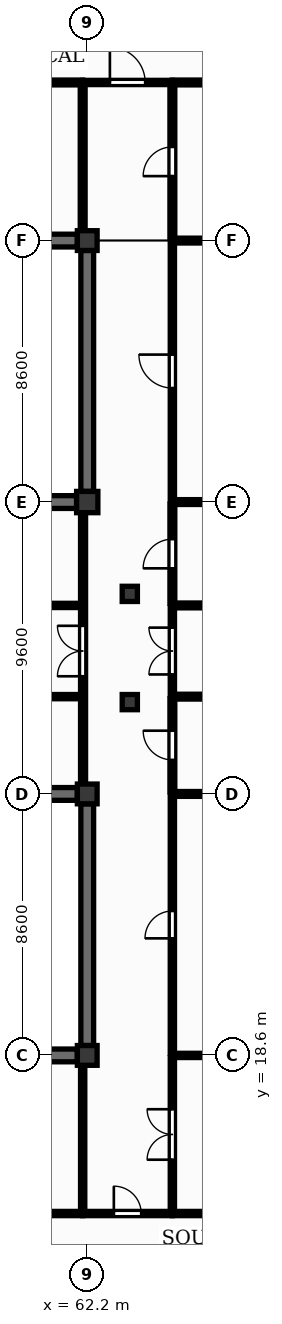
"""IFC4 building model, lengths in metres.
Left out: names, types, materials, properties, quantities, classifications, styles, units other than length and angle.
Written with IfcOpenShell. Run it as: python <this file> out.ifc"""

import sys

from ifc_helpers import new_model, si_unit, direction, frame, frame_2d, origin, origin_2d, place, context, subcontext, project, spatial, rectangle, extrude, element, fill, save


model = new_model("IFC4")
c1 = context("Model", 3, precision=1e-05, world=origin(), true_north=direction((0.0, 1.0)))
c2 = subcontext(c1, "Body", "Model", "MODEL_VIEW")
j1 = project(units=[si_unit("LENGTHUNIT", "METRE"), si_unit("PLANEANGLEUNIT", "RADIAN")], contexts=[c1])
p1 = place(None, origin())
s1 = spatial("IfcSite", under=j1, at=p1, CompositionType="ELEMENT")
p2 = place(p1, origin())
s2 = spatial("IfcBuilding", under=s1, at=p2, CompositionType="ELEMENT")
p3 = place(p2, frame((0.0, 0.0, -4.5)))
s3 = spatial("IfcBuildingStorey", under=s2, at=p3, CompositionType="ELEMENT", Elevation=-4.5)
for number, where, z_axis, x_axis in (
    (1, (62.2, 18.6, 0.0), (0.0, 0.0, 1.0), (1.0, 0.0, 0.0)),
    (2, (62.2, 27.2, 0.0), (0.0, 0.0, 1.0), (1.0, 0.0, 0.0)),
):
    element("IfcColumn", number, at=place(p3, frame(where, z_axis=z_axis, x_axis=x_axis)), inside=s3, PredefinedType="COLUMN", context=c2, shape_type="SweptSolid", body=[
        extrude(rectangle(XDim=0.65, YDim=0.65, at=origin_2d()), origin(), (0.0, 0.0, 1.0), 4.2),
    ])
p4 = place(p3, frame((62.2, 36.8, 0.0), z_axis=(0.0, 0.0, 1.0), x_axis=(1.0, 0.0, 0.0)))
e3 = element("IfcColumn", 3, at=p4, inside=s3, PredefinedType="COLUMN", context=c2, shape_type="SweptSolid", body=[
    extrude(rectangle(XDim=0.7, YDim=0.7, at=origin_2d()), origin(), (0.0, 0.0, 1.0), 4.2),
])
p5 = place(p3, frame((62.2, 45.4, 0.0), z_axis=(0.0, 0.0, 1.0), x_axis=(1.0, 0.0, 0.0)))
e4 = element("IfcColumn", 4, at=p5, inside=s3, PredefinedType="COLUMN", context=c2, shape_type="SweptSolid", body=[
    extrude(rectangle(XDim=0.65, YDim=0.65, at=origin_2d()), origin(), (0.0, 0.0, 1.0), 4.2),
])
p6 = place(p3, frame((55.35, 18.6, 0.0), z_axis=(0.0, 0.0, 1.0), x_axis=(1.0, 0.0, 0.0)))
e5 = element("IfcWall", 5, at=p6, inside=s3, PredefinedType="USERDEFINED", context=c2, shape_type="SweptSolid", body=[
    extrude(rectangle(XDim=6.525, YDim=0.42, at=frame_2d((3.262, 0.0))), origin(), (0.0, 0.0, 1.0), 4.2),
])
p7 = place(p3, frame((55.275, 27.2, 0.0), z_axis=(0.0, 0.0, 1.0), x_axis=(1.0, 0.0, 0.0)))
e6 = element("IfcWall", 6, at=p7, inside=s3, PredefinedType="USERDEFINED", context=c2, shape_type="SweptSolid", body=[
    extrude(rectangle(XDim=6.6, YDim=0.42, at=frame_2d((3.3, 0.0))), origin(), (0.0, 0.0, 1.0), 4.2),
])
p8 = place(p3, frame((55.275, 36.8, 0.0), z_axis=(0.0, 0.0, 1.0), x_axis=(1.0, 0.0, 0.0)))
e7 = element("IfcWall", 7, at=p8, inside=s3, PredefinedType="USERDEFINED", context=c2, shape_type="SweptSolid", body=[
    extrude(rectangle(XDim=6.575, YDim=0.42, at=frame_2d((3.288, 0.0))), origin(), (0.0, 0.0, 1.0), 4.2),
])
p9 = place(p3, frame((55.35, 45.4, 0.0), z_axis=(0.0, 0.0, 1.0), x_axis=(1.0, 0.0, 0.0)))
e8 = element("IfcWall", 8, at=p9, inside=s3, PredefinedType="USERDEFINED", context=c2, shape_type="SweptSolid", body=[
    extrude(rectangle(XDim=6.525, YDim=0.42, at=frame_2d((3.262, 0.0))), origin(), (0.0, 0.0, 1.0), 4.2),
])
p10 = place(p3, frame((62.2, 18.925, 0.0), z_axis=(0.0, 0.0, 1.0), x_axis=(0.0, 1.0, 0.0)))
e9 = element("IfcWall", 9, at=p10, inside=s3, PredefinedType="USERDEFINED", context=c2, shape_type="SweptSolid", body=[
    extrude(rectangle(XDim=7.95, YDim=0.42, at=frame_2d((3.975, 0.0))), origin(), (0.0, 0.0, 1.0), 4.2),
])
p11 = place(p3, frame((62.2, 37.15, 0.0), z_axis=(0.0, 0.0, 1.0), x_axis=(0.0, 1.0, 0.0)))
e10 = element("IfcWall", 10, at=p11, inside=s3, PredefinedType="USERDEFINED", context=c2, shape_type="SweptSolid", body=[
    extrude(rectangle(XDim=7.925, YDim=0.42, at=frame_2d((3.962, 0.0))), origin(), (0.0, 0.0, 1.0), 4.2),
])
for number, where, z_axis, x_axis in (
    (11, (63.6, 30.22, 0.0), (0.0, 0.0, 1.0), (1.0, 0.0, 0.0)),
    (12, (63.6, 33.78, 0.0), (0.0, 0.0, 1.0), (1.0, 0.0, 0.0)),
):
    element("IfcColumn", number, at=place(p3, frame(where, z_axis=z_axis, x_axis=x_axis)), inside=s3, PredefinedType="COLUMN", context=c2, shape_type="SweptSolid", body=[
        extrude(rectangle(XDim=0.5, YDim=0.5, at=origin_2d()), origin(), (0.0, 0.0, 1.0), 4.2),
    ])
p12 = place(p3, frame((55.0, 13.4, 0.0), z_axis=(0.0, 0.0, 1.0), x_axis=(1.0, 0.0, 0.0)))
e13 = element("IfcWall", 13, at=p12, inside=s3, PredefinedType="PARTITIONING", context=c2, shape_type="SweptSolid", body=[
    extrude(rectangle(XDim=7.05, YDim=0.14, at=frame_2d((3.525, 0.0))), origin(), (0.0, 0.0, 1.0), 4.08),
])
p13 = place(p12, frame((2.975, 0.0, 0.0)))
e14 = element("IfcOpeningElement", 14, at=p13, cuts=e13, PredefinedType="OPENING", context=c2, shape_type="SweptSolid", body=[
    extrude(rectangle(XDim=1.1, YDim=2.1, at=frame_2d((0.55, 1.05))), frame((0.0, 0.08, 0.0), z_axis=(0.0, -1.0, 0.0), x_axis=(1.0, 0.0, 0.0)), (0.0, 0.0, 1.0), 0.16),
])
p14 = place(p3, frame((55.0, 30.4, 0.0), z_axis=(0.0, 0.0, 1.0), x_axis=(1.0, 0.0, 0.0)))
e15 = element("IfcWall", 15, at=p14, inside=s3, PredefinedType="PARTITIONING", context=c2, shape_type="SweptSolid", body=[
    extrude(rectangle(XDim=7.05, YDim=0.14, at=frame_2d((3.525, 0.0))), origin(), (0.0, 0.0, 1.0), 4.08),
])
p15 = place(p14, frame((3.075, 0.0, 0.0)))
e16 = element("IfcOpeningElement", 16, at=p15, cuts=e15, PredefinedType="OPENING", context=c2, shape_type="SweptSolid", body=[
    extrude(rectangle(XDim=0.9, YDim=2.1, at=frame_2d((0.45, 1.05))), frame((0.0, 0.08, 0.0), z_axis=(0.0, -1.0, 0.0), x_axis=(1.0, 0.0, 0.0)), (0.0, 0.0, 1.0), 0.16),
])
p16 = place(p3, frame((55.0, 33.4, 0.0), z_axis=(0.0, 0.0, 1.0), x_axis=(1.0, 0.0, 0.0)))
e17 = element("IfcWall", 17, at=p16, inside=s3, PredefinedType="PARTITIONING", context=c2, shape_type="SweptSolid", body=[
    extrude(rectangle(XDim=7.05, YDim=0.14, at=frame_2d((3.525, 0.0))), origin(), (0.0, 0.0, 1.0), 4.08),
])
p17 = place(p16, frame((2.885, 0.0, 0.0)))
e18 = element("IfcOpeningElement", 18, at=p17, cuts=e17, PredefinedType="OPENING", context=c2, shape_type="SweptSolid", body=[
    extrude(rectangle(XDim=1.28, YDim=2.2, at=frame_2d((0.64, 1.1))), frame((0.0, 0.08, 0.0), z_axis=(0.0, -1.0, 0.0), x_axis=(1.0, 0.0, 0.0)), (0.0, 0.0, 1.0), 0.16),
])
p18 = place(p3, frame((55.0, 50.6, 0.0), z_axis=(0.0, 0.0, 1.0), x_axis=(1.0, 0.0, 0.0)))
e19 = element("IfcWall", 19, at=p18, inside=s3, PredefinedType="PARTITIONING", context=c2, shape_type="SweptSolid", body=[
    extrude(rectangle(XDim=7.05, YDim=0.16, at=frame_2d((3.525, 0.0))), origin(), (0.0, 0.0, 1.0), 4.08),
])
p19 = place(p18, frame((3.045, 0.0, 0.0)))
e20 = element("IfcOpeningElement", 20, at=p19, cuts=e19, PredefinedType="OPENING", context=c2, shape_type="SweptSolid", body=[
    extrude(rectangle(XDim=0.96, YDim=2.1, at=frame_2d((0.48, 1.05))), frame((0.0, 0.09, 0.0), z_axis=(0.0, -1.0, 0.0), x_axis=(1.0, 0.0, 0.0)), (0.0, 0.0, 1.0), 0.18),
])
p20 = place(p3, frame((62.05, 13.47, 0.0), z_axis=(0.0, 0.0, 1.0), x_axis=(0.0, 1.0, 0.0)))
e21 = element("IfcWall", 21, at=p20, inside=s3, PredefinedType="PARTITIONING", context=c2, shape_type="SweptSolid", body=[
    extrude(rectangle(XDim=4.805, YDim=0.14, at=frame_2d((2.402, 0.0))), origin(), (0.0, 0.0, 1.0), 3.5),
])
p21 = place(p3, frame((62.05, 13.4, 0.0), z_axis=(0.0, 0.0, 1.0), x_axis=(1.0, 0.0, 0.0)))
e22 = element("IfcWall", 22, at=p21, inside=s3, PredefinedType="PARTITIONING", context=c2, shape_type="SweptSolid", body=[
    extrude(rectangle(XDim=2.95, YDim=0.14, at=frame_2d((1.475, 0.0))), origin(), (0.0, 0.0, 1.0), 4.08),
])
p22 = place(p21, frame((1.025, 0.0, 0.0)))
e23 = element("IfcOpeningElement", 23, at=p22, cuts=e22, PredefinedType="OPENING", context=c2, shape_type="SweptSolid", body=[
    extrude(rectangle(XDim=0.9, YDim=2.1, at=frame_2d((0.45, 1.05))), frame((0.0, 0.08, 0.0), z_axis=(0.0, -1.0, 0.0), x_axis=(1.0, 0.0, 0.0)), (0.0, 0.0, 1.0), 0.16),
])
p23 = place(p3, frame((62.05, 27.525, 0.0), z_axis=(0.0, 0.0, 1.0), x_axis=(0.0, 1.0, 0.0)))
e24 = element("IfcWall", 24, at=p23, inside=s3, PredefinedType="PARTITIONING", context=c2, shape_type="SweptSolid", body=[
    extrude(rectangle(XDim=2.805, YDim=0.14, at=frame_2d((1.403, 0.0))), origin(), (0.0, 0.0, 1.0), 3.4),
])
p24 = place(p3, frame((62.05, 30.47, 0.0), z_axis=(0.0, 0.0, 1.0), x_axis=(0.0, 1.0, 0.0)))
e25 = element("IfcWall", 25, at=p24, inside=s3, PredefinedType="PARTITIONING", context=c2, shape_type="SweptSolid", body=[
    extrude(rectangle(XDim=2.86, YDim=0.14, at=frame_2d((1.43, 0.0))), origin(), (0.0, 0.0, 1.0), 3.4),
])
p25 = place(p24, frame((0.6, 0.0, 0.0)))
e26 = element("IfcOpeningElement", 26, at=p25, cuts=e25, PredefinedType="OPENING", context=c2, shape_type="SweptSolid", body=[
    extrude(rectangle(XDim=1.66, YDim=2.3, at=frame_2d((0.83, 1.15))), frame((0.0, 0.08, 0.0), z_axis=(0.0, -1.0, 0.0), x_axis=(1.0, 0.0, 0.0)), (0.0, 0.0, 1.0), 0.16),
])
p26 = place(p3, frame((62.05, 33.47, 0.0), z_axis=(0.0, 0.0, 1.0), x_axis=(0.0, 1.0, 0.0)))
e27 = element("IfcWall", 27, at=p26, inside=s3, PredefinedType="PARTITIONING", context=c2, shape_type="SweptSolid", body=[
    extrude(rectangle(XDim=2.98, YDim=0.14, at=frame_2d((1.49, 0.0))), origin(), (0.0, 0.0, 1.0), 3.4),
])
p27 = place(p3, frame((62.05, 45.725, 0.0), z_axis=(0.0, 0.0, 1.0), x_axis=(0.0, 1.0, 0.0)))
e28 = element("IfcWall", 28, at=p27, inside=s3, PredefinedType="PARTITIONING", context=c2, shape_type="SweptSolid", body=[
    extrude(rectangle(XDim=4.805, YDim=0.16, at=frame_2d((2.402, 0.0))), origin(), (0.0, 0.0, 1.0), 3.5),
])
p28 = place(p3, frame((62.05, 50.6, 0.0), z_axis=(0.0, 0.0, 1.0), x_axis=(1.0, 0.0, 0.0)))
e29 = element("IfcWall", 29, at=p28, inside=s3, PredefinedType="PARTITIONING", context=c2, shape_type="SweptSolid", body=[
    extrude(rectangle(XDim=2.95, YDim=0.14, at=frame_2d((1.475, 0.0))), origin(), (0.0, 0.0, 1.0), 4.08),
])
p29 = place(p28, frame((0.895, 0.0, 0.0)))
e30 = element("IfcOpeningElement", 30, at=p29, cuts=e29, PredefinedType="OPENING", context=c2, shape_type="SweptSolid", body=[
    extrude(rectangle(XDim=1.16, YDim=2.1, at=frame_2d((0.58, 1.05))), frame((0.0, 0.08, 0.0), z_axis=(0.0, -1.0, 0.0), x_axis=(1.0, 0.0, 0.0)), (0.0, 0.0, 1.0), 0.16),
])
p30 = place(p3, frame((65.0, 13.47, 0.0), z_axis=(0.0, 0.0, 1.0), x_axis=(0.0, 1.0, 0.0)))
e31 = element("IfcWall", 31, at=p30, inside=s3, PredefinedType="PARTITIONING", context=c2, shape_type="SweptSolid", body=[
    extrude(rectangle(XDim=5.06, YDim=0.14, at=frame_2d((2.53, 0.0))), origin(), (0.0, 0.0, 1.0), 4.08),
])
p31 = place(p30, frame((1.7, 0.0, 0.0)))
e32 = element("IfcOpeningElement", 32, at=p31, cuts=e31, PredefinedType="OPENING", context=c2, shape_type="SweptSolid", body=[
    extrude(rectangle(XDim=1.66, YDim=2.3, at=frame_2d((0.83, 1.15))), frame((0.0, 0.08, 0.0), z_axis=(0.0, -1.0, 0.0), x_axis=(1.0, 0.0, 0.0)), (0.0, 0.0, 1.0), 0.16),
])
p32 = place(p3, frame((65.0, 13.4, 0.0), z_axis=(0.0, 0.0, 1.0), x_axis=(1.0, 0.0, 0.0)))
e33 = element("IfcWall", 33, at=p32, inside=s3, PredefinedType="PARTITIONING", context=c2, shape_type="SweptSolid", body=[
    extrude(rectangle(XDim=6.795, YDim=0.14, at=frame_2d((3.397, 0.0))), origin(), (0.0, 0.0, 1.0), 4.08),
])
p33 = place(p3, frame((65.0, 18.67, 0.0), z_axis=(0.0, 0.0, 1.0), x_axis=(0.0, 1.0, 0.0)))
e34 = element("IfcWall", 34, at=p33, inside=s3, PredefinedType="PARTITIONING", context=c2, shape_type="SweptSolid", body=[
    extrude(rectangle(XDim=8.46, YDim=0.14, at=frame_2d((4.23, 0.0))), origin(), (0.0, 0.0, 1.0), 4.08),
])
p34 = place(p33, frame((3.78, 0.0, 0.0)))
e35 = element("IfcOpeningElement", 35, at=p34, cuts=e34, PredefinedType="OPENING", context=c2, shape_type="SweptSolid", body=[
    extrude(rectangle(XDim=0.9, YDim=2.1, at=frame_2d((0.45, 1.05))), frame((0.0, 0.08, 0.0), z_axis=(0.0, -1.0, 0.0), x_axis=(1.0, 0.0, 0.0)), (0.0, 0.0, 1.0), 0.16),
])
p35 = place(p3, frame((65.0, 18.6, 0.0), z_axis=(0.0, 0.0, 1.0), x_axis=(1.0, 0.0, 0.0)))
e36 = element("IfcWall", 36, at=p35, inside=s3, PredefinedType="PARTITIONING", context=c2, shape_type="SweptSolid", body=[
    extrude(rectangle(XDim=5.725, YDim=0.14, at=frame_2d((2.863, 0.0))), origin(), (0.0, 0.0, 1.0), 3.4),
])
p36 = place(p3, frame((65.0, 27.27, 0.0), z_axis=(0.0, 0.0, 1.0), x_axis=(0.0, 1.0, 0.0)))
e37 = element("IfcWall", 37, at=p36, inside=s3, PredefinedType="PARTITIONING", context=c2, shape_type="SweptSolid", body=[
    extrude(rectangle(XDim=3.06, YDim=0.16, at=frame_2d((1.53, 0.0))), origin(), (0.0, 0.0, 1.0), 4.08),
])
p37 = place(p36, frame((1.05, 0.0, 0.0)))
e38 = element("IfcOpeningElement", 38, at=p37, cuts=e37, PredefinedType="OPENING", context=c2, shape_type="SweptSolid", body=[
    extrude(rectangle(XDim=0.96, YDim=2.1, at=frame_2d((0.48, 1.05))), frame((0.0, 0.09, 0.0), z_axis=(0.0, -1.0, 0.0), x_axis=(1.0, 0.0, 0.0)), (0.0, 0.0, 1.0), 0.18),
])
p38 = place(p3, frame((65.0, 27.2, 0.0), z_axis=(0.0, 0.0, 1.0), x_axis=(1.0, 0.0, 0.0)))
e39 = element("IfcWall", 39, at=p38, inside=s3, PredefinedType="PARTITIONING", context=c2, shape_type="SweptSolid", body=[
    extrude(rectangle(XDim=5.65, YDim=0.16, at=frame_2d((2.825, 0.0))), origin(), (0.0, 0.0, 1.0), 3.4),
])
p39 = place(p3, frame((65.0, 30.47, 0.0), z_axis=(0.0, 0.0, 1.0), x_axis=(0.0, 1.0, 0.0)))
e40 = element("IfcWall", 40, at=p39, inside=s3, PredefinedType="PARTITIONING", context=c2, shape_type="SweptSolid", body=[
    extrude(rectangle(XDim=2.86, YDim=0.14, at=frame_2d((1.43, 0.0))), origin(), (0.0, 0.0, 1.0), 4.08),
])
p40 = place(p39, frame((0.66, 0.0, 0.0)))
e41 = element("IfcOpeningElement", 41, at=p40, cuts=e40, PredefinedType="OPENING", context=c2, shape_type="SweptSolid", body=[
    extrude(rectangle(XDim=1.54, YDim=2.25, at=frame_2d((0.77, 1.125))), frame((0.0, 0.08, 0.0), z_axis=(0.0, -1.0, 0.0), x_axis=(1.0, 0.0, 0.0)), (0.0, 0.0, 1.0), 0.16),
])
p41 = place(p3, frame((65.0, 30.4, 0.0), z_axis=(0.0, 0.0, 1.0), x_axis=(1.0, 0.0, 0.0)))
e42 = element("IfcWall", 42, at=p41, inside=s3, PredefinedType="PARTITIONING", context=c2, shape_type="SweptSolid", body=[
    extrude(rectangle(XDim=3.37, YDim=0.16, at=frame_2d((1.685, 0.0))), origin(), (0.0, 0.0, 1.0), 4.08),
])
p42 = place(p3, frame((65.0, 33.47, 0.0), z_axis=(0.0, 0.0, 1.0), x_axis=(0.0, 1.0, 0.0)))
e43 = element("IfcWall", 43, at=p42, inside=s3, PredefinedType="PARTITIONING", context=c2, shape_type="SweptSolid", body=[
    extrude(rectangle(XDim=3.26, YDim=0.16, at=frame_2d((1.63, 0.0))), origin(), (0.0, 0.0, 1.0), 4.08),
])
p43 = place(p42, frame((1.15, 0.0, 0.0)))
e44 = element("IfcOpeningElement", 44, at=p43, cuts=e43, PredefinedType="OPENING", context=c2, shape_type="SweptSolid", body=[
    extrude(rectangle(XDim=0.96, YDim=2.1, at=frame_2d((0.48, 1.05))), frame((0.0, 0.09, 0.0), z_axis=(0.0, -1.0, 0.0), x_axis=(1.0, 0.0, 0.0)), (0.0, 0.0, 1.0), 0.18),
])
p44 = place(p3, frame((65.0, 33.4, 0.0), z_axis=(0.0, 0.0, 1.0), x_axis=(1.0, 0.0, 0.0)))
e45 = element("IfcWall", 45, at=p44, inside=s3, PredefinedType="PARTITIONING", context=c2, shape_type="SweptSolid", body=[
    extrude(rectangle(XDim=3.37, YDim=0.16, at=frame_2d((1.685, 0.0))), origin(), (0.0, 0.0, 1.0), 4.08),
])
p45 = place(p3, frame((65.0, 36.87, 0.0), z_axis=(0.0, 0.0, 1.0), x_axis=(0.0, 1.0, 0.0)))
e46 = element("IfcWall", 46, at=p45, inside=s3, PredefinedType="PARTITIONING", context=c2, shape_type="SweptSolid", body=[
    extrude(rectangle(XDim=8.46, YDim=0.14, at=frame_2d((4.23, 0.0))), origin(), (0.0, 0.0, 1.0), 4.08),
])
p46 = place(p45, frame((3.68, 0.0, 0.0)))
e47 = element("IfcOpeningElement", 47, at=p46, cuts=e46, PredefinedType="OPENING", context=c2, shape_type="SweptSolid", body=[
    extrude(rectangle(XDim=1.1, YDim=2.1, at=frame_2d((0.55, 1.05))), frame((0.0, 0.08, 0.0), z_axis=(0.0, -1.0, 0.0), x_axis=(1.0, 0.0, 0.0)), (0.0, 0.0, 1.0), 0.16),
])
p47 = place(p3, frame((65.0, 36.8, 0.0), z_axis=(0.0, 0.0, 1.0), x_axis=(1.0, 0.0, 0.0)))
e48 = element("IfcWall", 48, at=p47, inside=s3, PredefinedType="PARTITIONING", context=c2, shape_type="SweptSolid", body=[
    extrude(rectangle(XDim=5.725, YDim=0.16, at=frame_2d((2.863, 0.0))), origin(), (0.0, 0.0, 1.0), 3.4),
])
p48 = place(p3, frame((65.0, 45.47, 0.0), z_axis=(0.0, 0.0, 1.0), x_axis=(0.0, 1.0, 0.0)))
e49 = element("IfcWall", 49, at=p48, inside=s3, PredefinedType="PARTITIONING", context=c2, shape_type="SweptSolid", body=[
    extrude(rectangle(XDim=5.06, YDim=0.16, at=frame_2d((2.53, 0.0))), origin(), (0.0, 0.0, 1.0), 4.08),
])
p49 = place(p48, frame((2.05, 0.0, 0.0)))
e50 = element("IfcOpeningElement", 50, at=p49, cuts=e49, PredefinedType="OPENING", context=c2, shape_type="SweptSolid", body=[
    extrude(rectangle(XDim=0.96, YDim=2.1, at=frame_2d((0.48, 1.05))), frame((0.0, 0.09, 0.0), z_axis=(0.0, -1.0, 0.0), x_axis=(1.0, 0.0, 0.0)), (0.0, 0.0, 1.0), 0.18),
])
p50 = place(p3, frame((65.0, 45.4, 0.0), z_axis=(0.0, 0.0, 1.0), x_axis=(1.0, 0.0, 0.0)))
e51 = element("IfcWall", 51, at=p50, inside=s3, PredefinedType="PARTITIONING", context=c2, shape_type="SweptSolid", body=[
    extrude(rectangle(XDim=5.725, YDim=0.16, at=frame_2d((2.863, 0.0))), origin(), (0.0, 0.0, 1.0), 3.4),
])
p51 = place(p3, frame((65.0, 50.6, 0.0), z_axis=(0.0, 0.0, 1.0), x_axis=(1.0, 0.0, 0.0)))
e52 = element("IfcWall", 52, at=p51, inside=s3, PredefinedType="PARTITIONING", context=c2, shape_type="SweptSolid", body=[
    extrude(rectangle(XDim=6.795, YDim=0.16, at=frame_2d((3.397, 0.0))), origin(), (0.0, 0.0, 1.0), 4.08),
])
p52 = place(p29, origin())
e53 = element("IfcDoor", 53, at=p52, inside=s3, OperationType="SINGLE_SWING_LEFT", PredefinedType="DOOR", context=c2, shape_type="SweptSolid", body=[
    extrude(rectangle(XDim=1.16, YDim=2.1, at=frame_2d((0.58, 1.05))), frame((0.0, 0.025, 0.0), z_axis=(0.0, -1.0, 0.0), x_axis=(1.0, 0.0, 0.0)), (0.0, 0.0, 1.0), 0.05),
])
fill(e30, e53)
p53 = place(p22, origin())
e54 = element("IfcDoor", 54, at=p53, inside=s3, OperationType="SINGLE_SWING_LEFT", PredefinedType="DOOR", context=c2, shape_type="SweptSolid", body=[
    extrude(rectangle(XDim=0.9, YDim=2.1, at=frame_2d((0.45, 1.05))), frame((0.0, 0.025, 0.0), z_axis=(0.0, -1.0, 0.0), x_axis=(1.0, 0.0, 0.0)), (0.0, 0.0, 1.0), 0.05),
])
fill(e23, e54)
p54 = place(p25, origin())
e55 = element("IfcDoor", 55, at=p54, inside=s3, OperationType="DOUBLE_DOOR_SINGLE_SWING", PredefinedType="DOOR", context=c2, shape_type="SweptSolid", body=[
    extrude(rectangle(XDim=1.66, YDim=2.3, at=frame_2d((0.83, 1.15))), frame((0.0, 0.025, 0.0), z_axis=(0.0, -1.0, 0.0), x_axis=(1.0, 0.0, 0.0)), (0.0, 0.0, 1.0), 0.05),
])
fill(e26, e55)
p55 = place(p40, origin())
e56 = element("IfcDoor", 56, at=p55, inside=s3, OperationType="DOUBLE_DOOR_SINGLE_SWING", PredefinedType="DOOR", context=c2, shape_type="SweptSolid", body=[
    extrude(rectangle(XDim=1.54, YDim=2.25, at=frame_2d((0.77, 1.125))), frame((0.0, 0.025, 0.0), z_axis=(0.0, -1.0, 0.0), x_axis=(1.0, 0.0, 0.0)), (0.0, 0.0, 1.0), 0.05),
])
fill(e41, e56)
p56 = place(p49, origin())
e57 = element("IfcDoor", 57, at=p56, inside=s3, OperationType="SINGLE_SWING_LEFT", PredefinedType="DOOR", context=c2, shape_type="SweptSolid", body=[
    extrude(rectangle(XDim=0.96, YDim=2.1, at=frame_2d((0.48, 1.05))), frame((0.0, 0.025, 0.0), z_axis=(0.0, -1.0, 0.0), x_axis=(1.0, 0.0, 0.0)), (0.0, 0.0, 1.0), 0.05),
])
fill(e50, e57)
p57 = place(p31, origin())
e58 = element("IfcDoor", 58, at=p57, inside=s3, OperationType="DOUBLE_DOOR_SINGLE_SWING", PredefinedType="DOOR", context=c2, shape_type="SweptSolid", body=[
    extrude(rectangle(XDim=1.66, YDim=2.3, at=frame_2d((0.83, 1.15))), frame((0.0, 0.025, 0.0), z_axis=(0.0, -1.0, 0.0), x_axis=(1.0, 0.0, 0.0)), (0.0, 0.0, 1.0), 0.05),
])
fill(e32, e58)
p58 = place(p34, origin())
e59 = element("IfcDoor", 59, at=p58, inside=s3, OperationType="SINGLE_SWING_LEFT", PredefinedType="DOOR", context=c2, shape_type="SweptSolid", body=[
    extrude(rectangle(XDim=0.9, YDim=2.1, at=frame_2d((0.45, 1.05))), frame((0.0, 0.025, 0.0), z_axis=(0.0, -1.0, 0.0), x_axis=(1.0, 0.0, 0.0)), (0.0, 0.0, 1.0), 0.05),
])
fill(e35, e59)
p59 = place(p37, origin())
e60 = element("IfcDoor", 60, at=p59, inside=s3, OperationType="SINGLE_SWING_RIGHT", PredefinedType="DOOR", context=c2, shape_type="SweptSolid", body=[
    extrude(rectangle(XDim=0.96, YDim=2.1, at=frame_2d((0.48, 1.05))), frame((0.0, 0.025, 0.0), z_axis=(0.0, -1.0, 0.0), x_axis=(1.0, 0.0, 0.0)), (0.0, 0.0, 1.0), 0.05),
])
fill(e38, e60)
p60 = place(p43, origin())
e61 = element("IfcDoor", 61, at=p60, inside=s3, OperationType="SINGLE_SWING_LEFT", PredefinedType="DOOR", context=c2, shape_type="SweptSolid", body=[
    extrude(rectangle(XDim=0.96, YDim=2.1, at=frame_2d((0.48, 1.05))), frame((0.0, 0.025, 0.0), z_axis=(0.0, -1.0, 0.0), x_axis=(1.0, 0.0, 0.0)), (0.0, 0.0, 1.0), 0.05),
])
fill(e44, e61)
p61 = place(p46, origin())
e62 = element("IfcDoor", 62, at=p61, inside=s3, OperationType="SINGLE_SWING_RIGHT", PredefinedType="DOOR", context=c2, shape_type="SweptSolid", body=[
    extrude(rectangle(XDim=1.1, YDim=2.1, at=frame_2d((0.55, 1.05))), frame((0.0, 0.025, 0.0), z_axis=(0.0, -1.0, 0.0), x_axis=(1.0, 0.0, 0.0)), (0.0, 0.0, 1.0), 0.05),
])
fill(e47, e62)
save(model, sys.argv[1])
